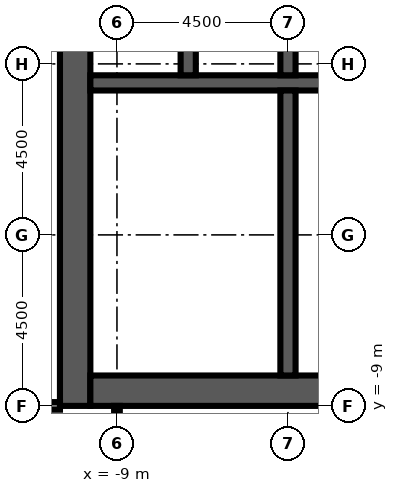
"""IFC4 building model, lengths in metres.
Left out: names, types, materials, properties, quantities, classifications, styles, units other than length and angle.
Written with IfcOpenShell. Run it as: python <this file> out.ifc"""

import sys

from ifc_helpers import new_model, si_unit, direction, frame, frame_2d, origin, place, context, subcontext, project, spatial, rectangle, extrude, element, fill, save


model = new_model("IFC4")
c1 = context("Model", 3, precision=1e-05, world=origin(), true_north=direction((0.0, 1.0)))
c2 = subcontext(c1, "Body", "Model", "MODEL_VIEW")
j1 = project(units=[si_unit("LENGTHUNIT", "METRE"), si_unit("PLANEANGLEUNIT", "RADIAN")], contexts=[c1])
p1 = place(None, origin())
s1 = spatial("IfcSite", under=j1, at=p1, CompositionType="ELEMENT")
p2 = place(p1, origin())
s2 = spatial("IfcBuilding", under=s1, at=p2, CompositionType="ELEMENT")
p3 = place(p2, frame((0.0, 0.0, 216.1)))
s3 = spatial("IfcBuildingStorey", under=s2, at=p3, CompositionType="ELEMENT", Elevation=216.1)
p4 = place(p3, frame((-10.1, -9.0, 0.0), z_axis=(0.0, 0.0, 1.0), x_axis=(0.0, 1.0, 0.0)))
e1 = element("IfcWall", 1, at=p4, inside=s3, PredefinedType="SHEAR", context=c2, shape_type="SweptSolid", body=[
    extrude(rectangle(XDim=27.5, YDim=0.8, at=frame_2d((13.75, 0.0))), origin(), (0.0, 0.0, 1.0), 4.1),
])
p5 = place(p4, frame((12.55, 0.0, 0.0)))
e2 = element("IfcOpeningElement", 2, at=p5, cuts=e1, PredefinedType="OPENING", context=c2, shape_type="SweptSolid", body=[
    extrude(rectangle(XDim=2.4, YDim=2.4, at=frame_2d((1.2, 1.2))), frame((0.0, 0.41, 0.0), z_axis=(0.0, -1.0, 0.0), x_axis=(1.0, 0.0, 0.0)), (0.0, 0.0, 1.0), 0.82),
])
p6 = place(p4, frame((6.825, 0.0, 0.0)))
e3 = element("IfcOpeningElement", 3, at=p6, cuts=e1, PredefinedType="OPENING", context=c2, shape_type="SweptSolid", body=[
    extrude(rectangle(XDim=1.2, YDim=2.1, at=frame_2d((0.6, 1.05))), frame((0.0, 0.41, 0.0), z_axis=(0.0, -1.0, 0.0), x_axis=(1.0, 0.0, 0.0)), (0.0, 0.0, 1.0), 0.82),
])
p7 = place(p4, frame((19.475, 0.0, 0.0)))
e4 = element("IfcOpeningElement", 4, at=p7, cuts=e1, PredefinedType="OPENING", context=c2, shape_type="SweptSolid", body=[
    extrude(rectangle(XDim=1.2, YDim=2.1, at=frame_2d((0.6, 1.05))), frame((0.0, 0.41, 0.0), z_axis=(0.0, -1.0, 0.0), x_axis=(1.0, 0.0, 0.0)), (0.0, 0.0, 1.0), 0.82),
])
p8 = place(p3, frame((-9.7, -8.6, 0.0), z_axis=(0.0, 0.0, 1.0), x_axis=(1.0, 0.0, 0.0)))
e5 = element("IfcWall", 5, at=p8, inside=s3, PredefinedType="SHEAR", context=c2, shape_type="SweptSolid", body=[
    extrude(rectangle(XDim=10.4, YDim=0.8, at=frame_2d((5.2, 0.0))), origin(), (0.0, 0.0, 1.0), 4.1),
])
p9 = place(p3, frame((-9.7, -0.5, 0.0), z_axis=(0.0, 0.0, 1.0), x_axis=(1.0, 0.0, 0.0)))
e6 = element("IfcWall", 6, at=p9, inside=s3, PredefinedType="SHEAR", context=c2, shape_type="SweptSolid", body=[
    extrude(rectangle(XDim=10.4, YDim=0.4, at=frame_2d((5.2, 0.0))), origin(), (0.0, 0.0, 1.0), 4.1),
])
for number, where, z_axis, x_axis in (
    (7, (-7.125, -0.3, 0.0), (0.0, 0.0, 1.0), (0.0, 1.0, 0.0)),
    (8, (-4.5, -0.3, 0.0), (0.0, 0.0, 1.0), (0.0, 1.0, 0.0)),
):
    element("IfcWall", number, at=place(p3, frame(where, z_axis=z_axis, x_axis=x_axis)), inside=s3, PredefinedType="SHEAR", context=c2, shape_type="SweptSolid", body=[
        extrude(rectangle(XDim=2.9, YDim=0.4, at=frame_2d((1.45, 0.0))), origin(), (0.0, 0.0, 1.0), 4.1),
    ])
p10 = place(p3, frame((-4.5, -8.2, 0.0), z_axis=(0.0, 0.0, 1.0), x_axis=(0.0, 1.0, 0.0)))
e9 = element("IfcWall", 9, at=p10, inside=s3, PredefinedType="SHEAR", context=c2, shape_type="SweptSolid", body=[
    extrude(rectangle(XDim=7.5, YDim=0.4, at=frame_2d((3.75, 0.0))), origin(), (0.0, 0.0, 1.0), 4.1),
])
p11 = place(p3, frame((-4.3, -3.7, 0.0), z_axis=(0.0, 0.0, 1.0), x_axis=(1.0, 0.0, 0.0)))
e10 = element("IfcWall", 10, at=p11, inside=s3, PredefinedType="PARTITIONING", context=c2, shape_type="SweptSolid", body=[
    extrude(rectangle(XDim=2.5, YDim=0.1, at=frame_2d((1.25, 0.0))), origin(), (0.0, 0.0, 1.0), 3.5),
])
p12 = place(p11, frame((0.75, 0.0, 0.0)))
e11 = element("IfcOpeningElement", 11, at=p12, cuts=e10, PredefinedType="OPENING", context=c2, shape_type="SweptSolid", body=[
    extrude(rectangle(XDim=1.0, YDim=2.1, at=frame_2d((0.5, 1.05))), frame((0.0, 0.06, 0.0), z_axis=(0.0, -1.0, 0.0), x_axis=(1.0, 0.0, 0.0)), (0.0, 0.0, 1.0), 0.12),
])
p13 = place(p3, frame((-4.3, -2.35, 0.0), z_axis=(0.0, 0.0, 1.0), x_axis=(1.0, 0.0, 0.0)))
e12 = element("IfcWall", 12, at=p13, inside=s3, PredefinedType="PARTITIONING", context=c2, shape_type="SweptSolid", body=[
    extrude(rectangle(XDim=2.5, YDim=0.1, at=frame_2d((1.25, 0.0))), origin(), (0.0, 0.0, 1.0), 3.5),
])
p14 = place(p13, frame((0.75, 0.0, 0.0)))
e13 = element("IfcOpeningElement", 13, at=p14, cuts=e12, PredefinedType="OPENING", context=c2, shape_type="SweptSolid", body=[
    extrude(rectangle(XDim=1.0, YDim=2.1, at=frame_2d((0.5, 1.05))), frame((0.0, 0.06, 0.0), z_axis=(0.0, -1.0, 0.0), x_axis=(1.0, 0.0, 0.0)), (0.0, 0.0, 1.0), 0.12),
])
p15 = place(p3, frame((-9.0, -9.0, 0.0), z_axis=(0.0, 0.0, 1.0), x_axis=(0.0, -1.0, 0.0)))
e14 = element("IfcWall", 14, at=p15, inside=s3, PredefinedType="PARTITIONING", context=c2, shape_type="SweptSolid", body=[
    extrude(rectangle(XDim=8.4, YDim=0.15, at=frame_2d((4.2, 0.0))), origin(), (0.0, 0.0, 1.0), 3.5),
])
p16 = place(p15, frame((7.1, 0.0, 0.0)))
e15 = element("IfcOpeningElement", 15, at=p16, cuts=e14, PredefinedType="OPENING", context=c2, shape_type="SweptSolid", body=[
    extrude(rectangle(XDim=1.0, YDim=2.1, at=frame_2d((0.5, 1.05))), frame((0.0, 0.085, 0.0), z_axis=(0.0, -1.0, 0.0), x_axis=(1.0, 0.0, 0.0)), (0.0, 0.0, 1.0), 0.17),
])
p17 = place(p3, frame((-10.5, -9.0, 0.0), z_axis=(0.0, 0.0, 1.0), x_axis=(-1.0, 0.0, 0.0)))
e16 = element("IfcWall", 16, at=p17, inside=s3, PredefinedType="PARTITIONING", context=c2, shape_type="SweptSolid", body=[
    extrude(rectangle(XDim=3.0, YDim=0.2, at=frame_2d((1.5, 0.0))), origin(), (0.0, 0.0, 1.0), 3.5),
])
p18 = place(p17, frame((0.9, 0.0, 0.0)))
e17 = element("IfcOpeningElement", 17, at=p18, cuts=e16, PredefinedType="OPENING", context=c2, shape_type="SweptSolid", body=[
    extrude(rectangle(XDim=1.0, YDim=2.1, at=frame_2d((0.5, 1.05))), frame((0.0, 0.11, 0.0), z_axis=(0.0, -1.0, 0.0), x_axis=(1.0, 0.0, 0.0)), (0.0, 0.0, 1.0), 0.22),
])
p19 = place(p6, origin())
e18 = element("IfcDoor", 18, at=p19, inside=s3, OperationType="SINGLE_SWING_LEFT", PredefinedType="DOOR", context=c2, shape_type="SweptSolid", body=[
    extrude(rectangle(XDim=1.2, YDim=2.1, at=frame_2d((0.6, 1.05))), frame((0.0, 0.025, 0.0), z_axis=(0.0, -1.0, 0.0), x_axis=(1.0, 0.0, 0.0)), (0.0, 0.0, 1.0), 0.05),
])
fill(e3, e18)
save(model, sys.argv[1])
